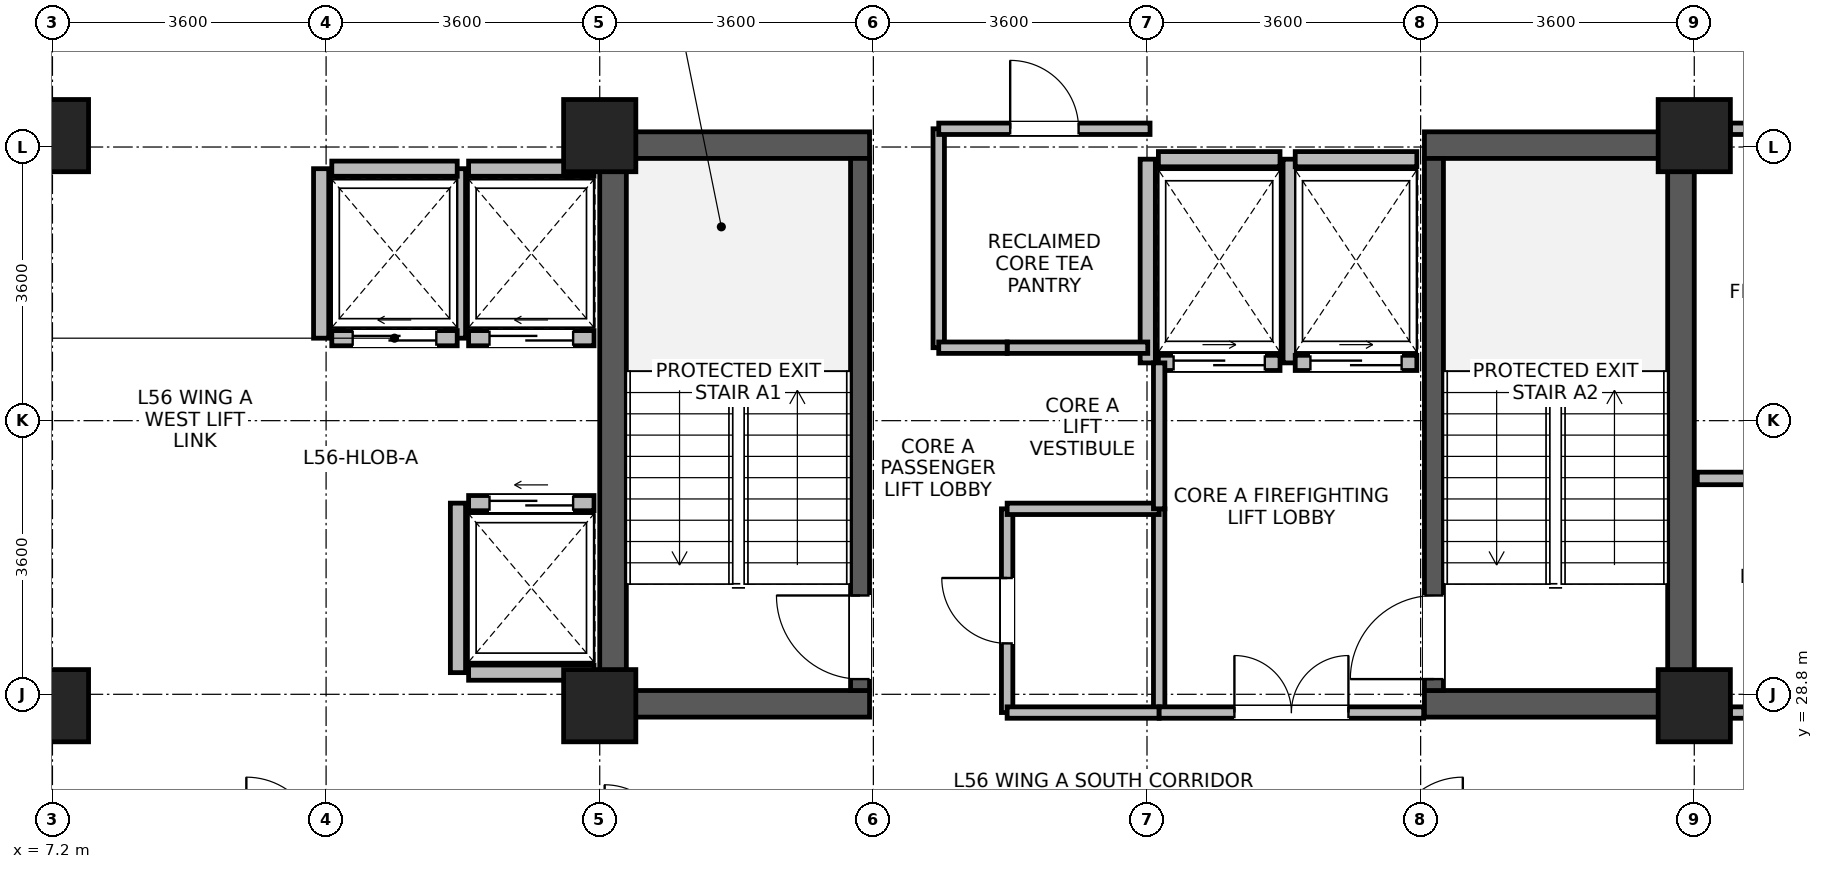
"""IFC4 building model, lengths in metres.
Left out: names, types, materials, properties, quantities, classifications, styles, units other than length and angle.
Written with IfcOpenShell. Run it as: python <this file> out.ifc"""

import sys

from ifc_helpers import new_model, si_unit, direction, frame, frame_2d, origin, origin_2d, place, context, subcontext, project, spatial, rectangle, extrude, source, transform, mapped, element, fill, save


model = new_model("IFC4")
c1 = context("Model", 3, precision=1e-05, world=origin(), true_north=direction((0.0, 1.0)))
c2 = subcontext(c1, "Body", "Model", "MODEL_VIEW")
j1 = project(units=[si_unit("LENGTHUNIT", "METRE"), si_unit("PLANEANGLEUNIT", "RADIAN")], contexts=[c1])
p1 = place(None, origin())
s1 = spatial("IfcSite", under=j1, at=p1, CompositionType="ELEMENT")
p2 = place(p1, origin())
s2 = spatial("IfcBuilding", under=s1, at=p2, CompositionType="ELEMENT")
p3 = place(p2, frame((0.0, 0.0, 220.3)))
s3 = spatial("IfcBuildingStorey", under=s2, at=p3, CompositionType="ELEMENT", Elevation=220.3)
for number, where, z_axis, x_axis in (
    (1, (14.575, 28.5, 0.0), (0.0, 0.0, 1.0), (0.0, 1.0, 0.0)),
    (2, (28.625, 28.5, 0.0), (0.0, 0.0, 1.0), (0.0, 1.0, 0.0)),
):
    element("IfcWall", number, at=place(p3, frame(where, z_axis=z_axis, x_axis=x_axis)), inside=s3, PredefinedType="SHEAR", context=c2, shape_type="SweptSolid", body=[
        extrude(rectangle(XDim=7.7, YDim=0.35, at=frame_2d((3.85, 0.0))), origin(), (0.0, 0.0, 1.0), 3.47),
    ])
for number, where, z_axis, x_axis in (
    (3, (14.75, 28.675, 0.0), (0.0, 0.0, 1.0), (1.0, 0.0, 0.0)),
    (4, (25.25, 28.675, 0.0), (0.0, 0.0, 1.0), (1.0, 0.0, 0.0)),
    (5, (14.75, 36.025, 0.0), (0.0, 0.0, 1.0), (1.0, 0.0, 0.0)),
    (6, (25.25, 36.025, 0.0), (0.0, 0.0, 1.0), (1.0, 0.0, 0.0)),
):
    element("IfcWall", number, at=place(p3, frame(where, z_axis=z_axis, x_axis=x_axis)), inside=s3, PredefinedType="SHEAR", context=c2, shape_type="SweptSolid", body=[
        extrude(rectangle(XDim=3.2, YDim=0.35, at=frame_2d((1.6, 0.0))), origin(), (0.0, 0.0, 1.0), 3.47),
    ])
p4 = place(p3, frame((17.825, 28.85, 0.0), z_axis=(0.0, 0.0, 1.0), x_axis=(0.0, 1.0, 0.0)))
e7 = element("IfcWall", 7, at=p4, inside=s3, PredefinedType="SHEAR", context=c2, shape_type="SweptSolid", body=[
    extrude(rectangle(XDim=7.0, YDim=0.25, at=frame_2d((3.5, 0.0))), origin(), (0.0, 0.0, 1.0), 3.47),
])
p5 = place(p4, frame((0.15, 0.0, 0.0)))
e8 = element("IfcOpeningElement", 8, at=p5, cuts=e7, PredefinedType="OPENING", context=c2, shape_type="SweptSolid", body=[
    extrude(rectangle(XDim=1.1, YDim=2.08, at=frame_2d((0.55, 1.04))), frame((0.0, 0.135, 0.0), z_axis=(0.0, -1.0, 0.0), x_axis=(1.0, 0.0, 0.0)), (0.0, 0.0, 1.0), 0.27),
])
p6 = place(p3, frame((25.375, 28.85, 0.0), z_axis=(0.0, 0.0, 1.0), x_axis=(0.0, 1.0, 0.0)))
e9 = element("IfcWall", 9, at=p6, inside=s3, PredefinedType="SHEAR", context=c2, shape_type="SweptSolid", body=[
    extrude(rectangle(XDim=7.0, YDim=0.25, at=frame_2d((3.5, 0.0))), origin(), (0.0, 0.0, 1.0), 3.47),
])
p7 = place(p6, frame((0.15, 0.0, 0.0)))
e10 = element("IfcOpeningElement", 10, at=p7, cuts=e9, PredefinedType="OPENING", context=c2, shape_type="SweptSolid", body=[
    extrude(rectangle(XDim=1.1, YDim=2.08, at=frame_2d((0.55, 1.04))), frame((0.0, 0.135, 0.0), z_axis=(0.0, -1.0, 0.0), x_axis=(1.0, 0.0, 0.0)), (0.0, 0.0, 1.0), 0.27),
])
m1 = source(origin(), c2, "Body", "SweptSolid", [
    extrude(rectangle(XDim=0.95, YDim=0.95, at=origin_2d()), origin(), (0.0, 0.0, 1.0), 3.7),
])
for number, where, z_axis, x_axis in (
    (11, (7.2, 28.65, 0.0), (0.0, 0.0, 1.0), (1.0, 0.0, 0.0)),
    (12, (7.2, 36.15, 0.0), (0.0, 0.0, 1.0), (1.0, 0.0, 0.0)),
    (13, (14.4, 28.65, 0.0), (0.0, 0.0, 1.0), (1.0, 0.0, 0.0)),
    (14, (14.4, 36.15, 0.0), (0.0, 0.0, 1.0), (1.0, 0.0, 0.0)),
    (15, (28.8, 28.65, 0.0), (0.0, 0.0, 1.0), (1.0, 0.0, 0.0)),
    (16, (28.8, 36.15, 0.0), (0.0, 0.0, 1.0), (1.0, 0.0, 0.0)),
):
    element("IfcColumn", number, at=place(p3, frame(where, z_axis=z_axis, x_axis=x_axis)), inside=s3, PredefinedType="COLUMN", context=c2, shape_type="MappedRepresentation", body=[
        mapped(m1, transform((0.0, 0.0, 0.0), x_axis=(1.0, 0.0, 0.0), y_axis=(0.0, 1.0, 0.0), z_axis=(0.0, 0.0, 1.0), scale=1.0)),
    ])
p8 = place(p3, frame((12.675, 33.485, 0.0), z_axis=(0.0, 0.0, 1.0), x_axis=(1.0, 0.0, 0.0)))
e17 = element("IfcWall", 17, at=p8, inside=s3, PredefinedType="PARTITIONING", context=c2, shape_type="SweptSolid", body=[
    extrude(rectangle(XDim=1.65, YDim=0.2, at=frame_2d((0.825, 0.0))), origin(), (0.0, 0.0, 1.0), 3.45),
])
p9 = place(p8, frame((0.275, 0.0, 0.0)))
e18 = element("IfcOpeningElement", 18, at=p9, cuts=e17, PredefinedType="OPENING", context=c2, shape_type="SweptSolid", body=[
    extrude(rectangle(XDim=1.1, YDim=2.12, at=frame_2d((0.55, 1.06))), frame((0.0, 0.11, 0.0), z_axis=(0.0, -1.0, 0.0), x_axis=(1.0, 0.0, 0.0)), (0.0, 0.0, 1.0), 0.22),
])
p10 = place(p3, frame((12.675, 35.715, 0.0), z_axis=(0.0, 0.0, 1.0), x_axis=(1.0, 0.0, 0.0)))
e19 = element("IfcWall", 19, at=p10, inside=s3, PredefinedType="PARTITIONING", context=c2, shape_type="SweptSolid", body=[
    extrude(rectangle(XDim=1.65, YDim=0.2, at=frame_2d((0.825, 0.0))), origin(), (0.0, 0.0, 1.0), 3.45),
])
p11 = place(p3, frame((12.535, 33.485, 0.0), z_axis=(0.0, 0.0, 1.0), x_axis=(0.0, 1.0, 0.0)))
e20 = element("IfcWall", 20, at=p11, inside=s3, PredefinedType="PARTITIONING", context=c2, shape_type="SweptSolid", body=[
    extrude(rectangle(XDim=2.23, YDim=0.2, at=frame_2d((1.115, 0.0))), origin(), (0.0, 0.0, 1.0), 3.45),
])
p12 = place(p3, frame((12.675, 29.085, 0.0), z_axis=(0.0, 0.0, 1.0), x_axis=(1.0, 0.0, 0.0)))
e21 = element("IfcWall", 21, at=p12, inside=s3, PredefinedType="PARTITIONING", context=c2, shape_type="SweptSolid", body=[
    extrude(rectangle(XDim=1.65, YDim=0.2, at=frame_2d((0.825, 0.0))), origin(), (0.0, 0.0, 1.0), 3.45),
])
p13 = place(p3, frame((12.675, 31.315, 0.0), z_axis=(0.0, 0.0, 1.0), x_axis=(1.0, 0.0, 0.0)))
e22 = element("IfcWall", 22, at=p13, inside=s3, PredefinedType="PARTITIONING", context=c2, shape_type="SweptSolid", body=[
    extrude(rectangle(XDim=1.65, YDim=0.2, at=frame_2d((0.825, 0.0))), origin(), (0.0, 0.0, 1.0), 3.45),
])
p14 = place(p13, frame((0.275, 0.0, 0.0)))
e23 = element("IfcOpeningElement", 23, at=p14, cuts=e22, PredefinedType="OPENING", context=c2, shape_type="SweptSolid", body=[
    extrude(rectangle(XDim=1.1, YDim=2.12, at=frame_2d((0.55, 1.06))), frame((0.0, 0.11, 0.0), z_axis=(0.0, -1.0, 0.0), x_axis=(1.0, 0.0, 0.0)), (0.0, 0.0, 1.0), 0.22),
])
p15 = place(p3, frame((12.535, 29.085, 0.0), z_axis=(0.0, 0.0, 1.0), x_axis=(0.0, 1.0, 0.0)))
e24 = element("IfcWall", 24, at=p15, inside=s3, PredefinedType="PARTITIONING", context=c2, shape_type="SweptSolid", body=[
    extrude(rectangle(XDim=2.23, YDim=0.2, at=frame_2d((1.115, 0.0))), origin(), (0.0, 0.0, 1.0), 3.45),
])
p16 = place(p3, frame((10.875, 33.485, 0.0), z_axis=(0.0, 0.0, 1.0), x_axis=(1.0, 0.0, 0.0)))
e25 = element("IfcWall", 25, at=p16, inside=s3, PredefinedType="PARTITIONING", context=c2, shape_type="SweptSolid", body=[
    extrude(rectangle(XDim=1.65, YDim=0.2, at=frame_2d((0.825, 0.0))), origin(), (0.0, 0.0, 1.0), 3.45),
])
p17 = place(p16, frame((0.275, 0.0, 0.0)))
e26 = element("IfcOpeningElement", 26, at=p17, cuts=e25, PredefinedType="OPENING", context=c2, shape_type="SweptSolid", body=[
    extrude(rectangle(XDim=1.1, YDim=2.12, at=frame_2d((0.55, 1.06))), frame((0.0, 0.11, 0.0), z_axis=(0.0, -1.0, 0.0), x_axis=(1.0, 0.0, 0.0)), (0.0, 0.0, 1.0), 0.22),
])
p18 = place(p3, frame((10.875, 35.715, 0.0), z_axis=(0.0, 0.0, 1.0), x_axis=(1.0, 0.0, 0.0)))
e27 = element("IfcWall", 27, at=p18, inside=s3, PredefinedType="PARTITIONING", context=c2, shape_type="SweptSolid", body=[
    extrude(rectangle(XDim=1.65, YDim=0.2, at=frame_2d((0.825, 0.0))), origin(), (0.0, 0.0, 1.0), 3.45),
])
p19 = place(p3, frame((10.735, 33.485, 0.0), z_axis=(0.0, 0.0, 1.0), x_axis=(0.0, 1.0, 0.0)))
e28 = element("IfcWall", 28, at=p19, inside=s3, PredefinedType="PARTITIONING", context=c2, shape_type="SweptSolid", body=[
    extrude(rectangle(XDim=2.23, YDim=0.2, at=frame_2d((1.115, 0.0))), origin(), (0.0, 0.0, 1.0), 3.45),
])
p20 = place(p3, frame((21.75, 33.16, 0.0), z_axis=(0.0, 0.0, 1.0), x_axis=(1.0, 0.0, 0.0)))
e29 = element("IfcWall", 29, at=p20, inside=s3, PredefinedType="PARTITIONING", context=c2, shape_type="SweptSolid", body=[
    extrude(rectangle(XDim=1.6, YDim=0.2, at=frame_2d((0.8, 0.0))), origin(), (0.0, 0.0, 1.0), 3.45),
])
p21 = place(p20, frame((0.2, 0.0, 0.0)))
e30 = element("IfcOpeningElement", 30, at=p21, cuts=e29, PredefinedType="OPENING", context=c2, shape_type="SweptSolid", body=[
    extrude(rectangle(XDim=1.2, YDim=2.12, at=frame_2d((0.6, 1.06))), frame((0.0, 0.11, 0.0), z_axis=(0.0, -1.0, 0.0), x_axis=(1.0, 0.0, 0.0)), (0.0, 0.0, 1.0), 0.22),
])
p22 = place(p3, frame((21.75, 35.84, 0.0), z_axis=(0.0, 0.0, 1.0), x_axis=(1.0, 0.0, 0.0)))
e31 = element("IfcWall", 31, at=p22, inside=s3, PredefinedType="PARTITIONING", context=c2, shape_type="SweptSolid", body=[
    extrude(rectangle(XDim=1.6, YDim=0.2, at=frame_2d((0.8, 0.0))), origin(), (0.0, 0.0, 1.0), 2.55),
])
for number, where, z_axis, x_axis in (
    (32, (21.61, 33.16, 0.0), (0.0, 0.0, 1.0), (0.0, 1.0, 0.0)),
    (33, (23.49, 33.16, 0.0), (0.0, 0.0, 1.0), (0.0, 1.0, 0.0)),
):
    element("IfcWall", number, at=place(p3, frame(where, z_axis=z_axis, x_axis=x_axis)), inside=s3, PredefinedType="PARTITIONING", context=c2, shape_type="SweptSolid", body=[
        extrude(rectangle(XDim=2.68, YDim=0.2, at=frame_2d((1.34, 0.0))), origin(), (0.0, 0.0, 1.0), 3.45),
    ])
p23 = place(p3, frame((23.55, 33.16, 0.0), z_axis=(0.0, 0.0, 1.0), x_axis=(1.0, 0.0, 0.0)))
e34 = element("IfcWall", 34, at=p23, inside=s3, PredefinedType="PARTITIONING", context=c2, shape_type="SweptSolid", body=[
    extrude(rectangle(XDim=1.6, YDim=0.2, at=frame_2d((0.8, 0.0))), origin(), (0.0, 0.0, 1.0), 3.45),
])
p24 = place(p23, frame((0.2, 0.0, 0.0)))
e35 = element("IfcOpeningElement", 35, at=p24, cuts=e34, PredefinedType="OPENING", context=c2, shape_type="SweptSolid", body=[
    extrude(rectangle(XDim=1.2, YDim=2.12, at=frame_2d((0.6, 1.06))), frame((0.0, 0.11, 0.0), z_axis=(0.0, -1.0, 0.0), x_axis=(1.0, 0.0, 0.0)), (0.0, 0.0, 1.0), 0.22),
])
p25 = place(p3, frame((23.55, 35.84, 0.0), z_axis=(0.0, 0.0, 1.0), x_axis=(1.0, 0.0, 0.0)))
e36 = element("IfcWall", 36, at=p25, inside=s3, PredefinedType="PARTITIONING", context=c2, shape_type="SweptSolid", body=[
    extrude(rectangle(XDim=1.6, YDim=0.2, at=frame_2d((0.8, 0.0))), origin(), (0.0, 0.0, 1.0), 2.55),
])
p26 = place(p3, frame((29.275, 28.56, 0.0), z_axis=(0.0, 0.0, 1.0), x_axis=(1.0, 0.0, 0.0)))
e37 = element("IfcWall", 37, at=p26, inside=s3, PredefinedType="PARTITIONING", context=c2, shape_type="SweptSolid", body=[
    extrude(rectangle(XDim=4.085, YDim=0.15, at=frame_2d((2.042, 0.0))), origin(), (0.0, 0.0, 1.0), 2.9),
])
p27 = place(p26, frame((1.613, 0.0, 0.0)))
e38 = element("IfcOpeningElement", 38, at=p27, cuts=e37, PredefinedType="OPENING", context=c2, shape_type="SweptSolid", body=[
    extrude(rectangle(XDim=0.86, YDim=2.02, at=frame_2d((0.43, 1.01))), frame((0.0, 0.085, 0.0), z_axis=(0.0, -1.0, 0.0), x_axis=(1.0, 0.0, 0.0)), (0.0, 0.0, 1.0), 0.17),
])
p28 = place(p3, frame((29.275, 36.24, 0.0), z_axis=(0.0, 0.0, 1.0), x_axis=(1.0, 0.0, 0.0)))
e39 = element("IfcWall", 39, at=p28, inside=s3, PredefinedType="PARTITIONING", context=c2, shape_type="SweptSolid", body=[
    extrude(rectangle(XDim=4.085, YDim=0.15, at=frame_2d((2.042, 0.0))), origin(), (0.0, 0.0, 1.0), 2.9),
])
p29 = place(p3, frame((18.86, 33.36, 0.0), z_axis=(0.0, 0.0, 1.0), x_axis=(0.0, 1.0, 0.0)))
e40 = element("IfcWall", 40, at=p29, inside=s3, PredefinedType="PARTITIONING", context=c2, shape_type="SweptSolid", body=[
    extrude(rectangle(XDim=2.88, YDim=0.15, at=frame_2d((1.44, 0.0))), origin(), (0.0, 0.0, 1.0), 3.45),
])
p30 = place(p3, frame((18.86, 36.24, 0.0), z_axis=(0.0, 0.0, 1.0), x_axis=(1.0, 0.0, 0.0)))
e41 = element("IfcWall", 41, at=p30, inside=s3, PredefinedType="PARTITIONING", context=c2, shape_type="SweptSolid", body=[
    extrude(rectangle(XDim=2.78, YDim=0.15, at=frame_2d((1.39, 0.0))), origin(), (0.0, 0.0, 1.0), 2.55),
])
p31 = place(p30, frame((0.94, 0.0, 0.0)))
e42 = element("IfcOpeningElement", 42, at=p31, cuts=e41, PredefinedType="OPENING", context=c2, shape_type="SweptSolid", body=[
    extrude(rectangle(XDim=0.9, YDim=2.08, at=frame_2d((0.45, 1.04))), frame((0.0, 0.085, 0.0), z_axis=(0.0, -1.0, 0.0), x_axis=(1.0, 0.0, 0.0)), (0.0, 0.0, 1.0), 0.17),
])
p32 = place(p3, frame((19.76, 28.56, 0.0), z_axis=(0.0, 0.0, 1.0), x_axis=(0.0, 1.0, 0.0)))
e43 = element("IfcWall", 43, at=p32, inside=s3, PredefinedType="PARTITIONING", context=c2, shape_type="SweptSolid", body=[
    extrude(rectangle(XDim=2.68, YDim=0.15, at=frame_2d((1.34, 0.0))), origin(), (0.0, 0.0, 1.0), 3.45),
])
p33 = place(p32, frame((0.91, 0.0, 0.0)))
e44 = element("IfcOpeningElement", 44, at=p33, cuts=e43, PredefinedType="OPENING", context=c2, shape_type="SweptSolid", body=[
    extrude(rectangle(XDim=0.86, YDim=2.02, at=frame_2d((0.43, 1.01))), frame((0.0, 0.085, 0.0), z_axis=(0.0, -1.0, 0.0), x_axis=(1.0, 0.0, 0.0)), (0.0, 0.0, 1.0), 0.17),
])
p34 = place(p3, frame((21.76, 28.56, 0.0), z_axis=(0.0, 0.0, 1.0), x_axis=(0.0, 1.0, 0.0)))
e45 = element("IfcWall", 45, at=p34, inside=s3, PredefinedType="PARTITIONING", context=c2, shape_type="SweptSolid", body=[
    extrude(rectangle(XDim=2.68, YDim=0.15, at=frame_2d((1.34, 0.0))), origin(), (0.0, 0.0, 1.0), 3.45),
])
p35 = place(p3, frame((19.76, 28.56, 0.0), z_axis=(0.0, 0.0, 1.0), x_axis=(1.0, 0.0, 0.0)))
e46 = element("IfcWall", 46, at=p35, inside=s3, PredefinedType="PARTITIONING", context=c2, shape_type="SweptSolid", body=[
    extrude(rectangle(XDim=2.0, YDim=0.15, at=frame_2d((1.0, 0.0))), origin(), (0.0, 0.0, 1.0), 2.55),
])
p36 = place(p3, frame((19.76, 31.24, 0.0), z_axis=(0.0, 0.0, 1.0), x_axis=(1.0, 0.0, 0.0)))
e47 = element("IfcWall", 47, at=p36, inside=s3, PredefinedType="PARTITIONING", context=c2, shape_type="SweptSolid", body=[
    extrude(rectangle(XDim=2.0, YDim=0.15, at=frame_2d((1.0, 0.0))), origin(), (0.0, 0.0, 1.0), 3.45),
])
p37 = place(p3, frame((19.76, 33.36, 0.0), z_axis=(0.0, 0.0, 1.0), x_axis=(1.0, 0.0, 0.0)))
e48 = element("IfcWall", 48, at=p37, inside=s3, PredefinedType="PARTITIONING", context=c2, shape_type="SweptSolid", body=[
    extrude(rectangle(XDim=1.85, YDim=0.15, at=frame_2d((0.925, 0.0))), origin(), (0.0, 0.0, 1.0), 3.45),
])
p38 = place(p3, frame((18.86, 33.36, 0.0), z_axis=(0.0, 0.0, 1.0), x_axis=(1.0, 0.0, 0.0)))
e49 = element("IfcWall", 49, at=p38, inside=s3, PredefinedType="PARTITIONING", context=c2, shape_type="SweptSolid", body=[
    extrude(rectangle(XDim=0.9, YDim=0.15, at=frame_2d((0.45, 0.0))), origin(), (0.0, 0.0, 1.0), 3.45),
])
p39 = place(p3, frame((28.84, 31.64, 0.0), z_axis=(0.0, 0.0, 1.0), x_axis=(1.0, 0.0, 0.0)))
e50 = element("IfcWall", 50, at=p39, inside=s3, PredefinedType="PARTITIONING", context=c2, shape_type="SweptSolid", body=[
    extrude(rectangle(XDim=4.52, YDim=0.165, at=frame_2d((2.26, 0.0))), origin(), (0.0, 0.0, 1.0), 3.45),
])
p40 = place(p3, frame((21.76, 28.56, 0.0), z_axis=(0.0, 0.0, 1.0), x_axis=(1.0, 0.0, 0.0)))
e51 = element("IfcWall", 51, at=p40, inside=s3, PredefinedType="PARTITIONING", context=c2, shape_type="SweptSolid", body=[
    extrude(rectangle(XDim=3.48, YDim=0.15, at=frame_2d((1.74, 0.0))), origin(), (0.0, 0.0, 1.0), 2.55),
])
p41 = place(p40, frame((0.99, 0.0, 0.0)))
e52 = element("IfcOpeningElement", 52, at=p41, cuts=e51, PredefinedType="OPENING", context=c2, shape_type="SweptSolid", body=[
    extrude(rectangle(XDim=1.5, YDim=2.1, at=frame_2d((0.75, 1.05))), frame((0.0, 0.085, 0.0), z_axis=(0.0, -1.0, 0.0), x_axis=(1.0, 0.0, 0.0)), (0.0, 0.0, 1.0), 0.17),
])
p42 = place(p3, frame((21.76, 31.24, 0.0), z_axis=(0.0, 0.0, 1.0), x_axis=(0.0, 1.0, 0.0)))
e53 = element("IfcWall", 53, at=p42, inside=s3, PredefinedType="PARTITIONING", context=c2, shape_type="SweptSolid", body=[
    extrude(rectangle(XDim=1.92, YDim=0.15, at=frame_2d((0.96, 0.0))), origin(), (0.0, 0.0, 1.0), 3.45),
])
p43 = place(p5, origin())
e54 = element("IfcDoor", 54, at=p43, inside=s3, OperationType="SINGLE_SWING_RIGHT", PredefinedType="DOOR", context=c2, shape_type="SweptSolid", body=[
    extrude(rectangle(XDim=1.1, YDim=2.08, at=frame_2d((0.55, 1.04))), frame((0.0, 0.025, 0.0), z_axis=(0.0, -1.0, 0.0), x_axis=(1.0, 0.0, 0.0)), (0.0, 0.0, 1.0), 0.05),
])
fill(e8, e54)
p44 = place(p7, origin())
e55 = element("IfcDoor", 55, at=p44, inside=s3, OperationType="SINGLE_SWING_LEFT", PredefinedType="DOOR", context=c2, shape_type="SweptSolid", body=[
    extrude(rectangle(XDim=1.1, YDim=2.08, at=frame_2d((0.55, 1.04))), frame((0.0, 0.025, 0.0), z_axis=(0.0, -1.0, 0.0), x_axis=(1.0, 0.0, 0.0)), (0.0, 0.0, 1.0), 0.05),
])
fill(e10, e55)
p45 = place(p9, origin())
e56 = element("IfcDoor", 56, at=p45, inside=s3, OperationType="SLIDING_TO_LEFT", PredefinedType="DOOR", context=c2, shape_type="SweptSolid", body=[
    extrude(rectangle(XDim=1.1, YDim=2.12, at=frame_2d((0.55, 1.06))), frame((0.0, 0.025, 0.0), z_axis=(0.0, -1.0, 0.0), x_axis=(1.0, 0.0, 0.0)), (0.0, 0.0, 1.0), 0.05),
])
fill(e18, e56)
p46 = place(p14, origin())
e57 = element("IfcDoor", 57, at=p46, inside=s3, OperationType="SLIDING_TO_LEFT", PredefinedType="DOOR", context=c2, shape_type="SweptSolid", body=[
    extrude(rectangle(XDim=1.1, YDim=2.12, at=frame_2d((0.55, 1.06))), frame((0.0, 0.025, 0.0), z_axis=(0.0, -1.0, 0.0), x_axis=(1.0, 0.0, 0.0)), (0.0, 0.0, 1.0), 0.05),
])
fill(e23, e57)
p47 = place(p17, origin())
e58 = element("IfcDoor", 58, at=p47, inside=s3, OperationType="SLIDING_TO_LEFT", PredefinedType="DOOR", context=c2, shape_type="SweptSolid", body=[
    extrude(rectangle(XDim=1.1, YDim=2.12, at=frame_2d((0.55, 1.06))), frame((0.0, 0.025, 0.0), z_axis=(0.0, -1.0, 0.0), x_axis=(1.0, 0.0, 0.0)), (0.0, 0.0, 1.0), 0.05),
])
fill(e26, e58)
p48 = place(p21, origin())
e59 = element("IfcDoor", 59, at=p48, inside=s3, OperationType="SLIDING_TO_RIGHT", PredefinedType="DOOR", context=c2, shape_type="SweptSolid", body=[
    extrude(rectangle(XDim=1.2, YDim=2.12, at=frame_2d((0.6, 1.06))), frame((0.0, 0.025, 0.0), z_axis=(0.0, -1.0, 0.0), x_axis=(1.0, 0.0, 0.0)), (0.0, 0.0, 1.0), 0.05),
])
fill(e30, e59)
p49 = place(p24, origin())
e60 = element("IfcDoor", 60, at=p49, inside=s3, OperationType="SLIDING_TO_RIGHT", PredefinedType="DOOR", context=c2, shape_type="SweptSolid", body=[
    extrude(rectangle(XDim=1.2, YDim=2.12, at=frame_2d((0.6, 1.06))), frame((0.0, 0.025, 0.0), z_axis=(0.0, -1.0, 0.0), x_axis=(1.0, 0.0, 0.0)), (0.0, 0.0, 1.0), 0.05),
])
fill(e35, e60)
p50 = place(p31, origin())
e61 = element("IfcDoor", 61, at=p50, inside=s3, OperationType="SINGLE_SWING_LEFT", PredefinedType="DOOR", context=c2, shape_type="SweptSolid", body=[
    extrude(rectangle(XDim=0.9, YDim=2.08, at=frame_2d((0.45, 1.04))), frame((0.0, 0.025, 0.0), z_axis=(0.0, -1.0, 0.0), x_axis=(1.0, 0.0, 0.0)), (0.0, 0.0, 1.0), 0.05),
])
fill(e42, e61)
p51 = place(p33, origin())
e62 = element("IfcDoor", 62, at=p51, inside=s3, OperationType="SINGLE_SWING_RIGHT", PredefinedType="DOOR", context=c2, shape_type="SweptSolid", body=[
    extrude(rectangle(XDim=0.86, YDim=2.02, at=frame_2d((0.43, 1.01))), frame((0.0, 0.025, 0.0), z_axis=(0.0, -1.0, 0.0), x_axis=(1.0, 0.0, 0.0)), (0.0, 0.0, 1.0), 0.05),
])
fill(e44, e62)
p52 = place(p41, origin())
e63 = element("IfcDoor", 63, at=p52, inside=s3, OperationType="DOUBLE_DOOR_SINGLE_SWING", PredefinedType="DOOR", context=c2, shape_type="SweptSolid", body=[
    extrude(rectangle(XDim=1.5, YDim=2.1, at=frame_2d((0.75, 1.05))), frame((0.0, 0.025, 0.0), z_axis=(0.0, -1.0, 0.0), x_axis=(1.0, 0.0, 0.0)), (0.0, 0.0, 1.0), 0.05),
])
fill(e52, e63)
save(model, sys.argv[1])
